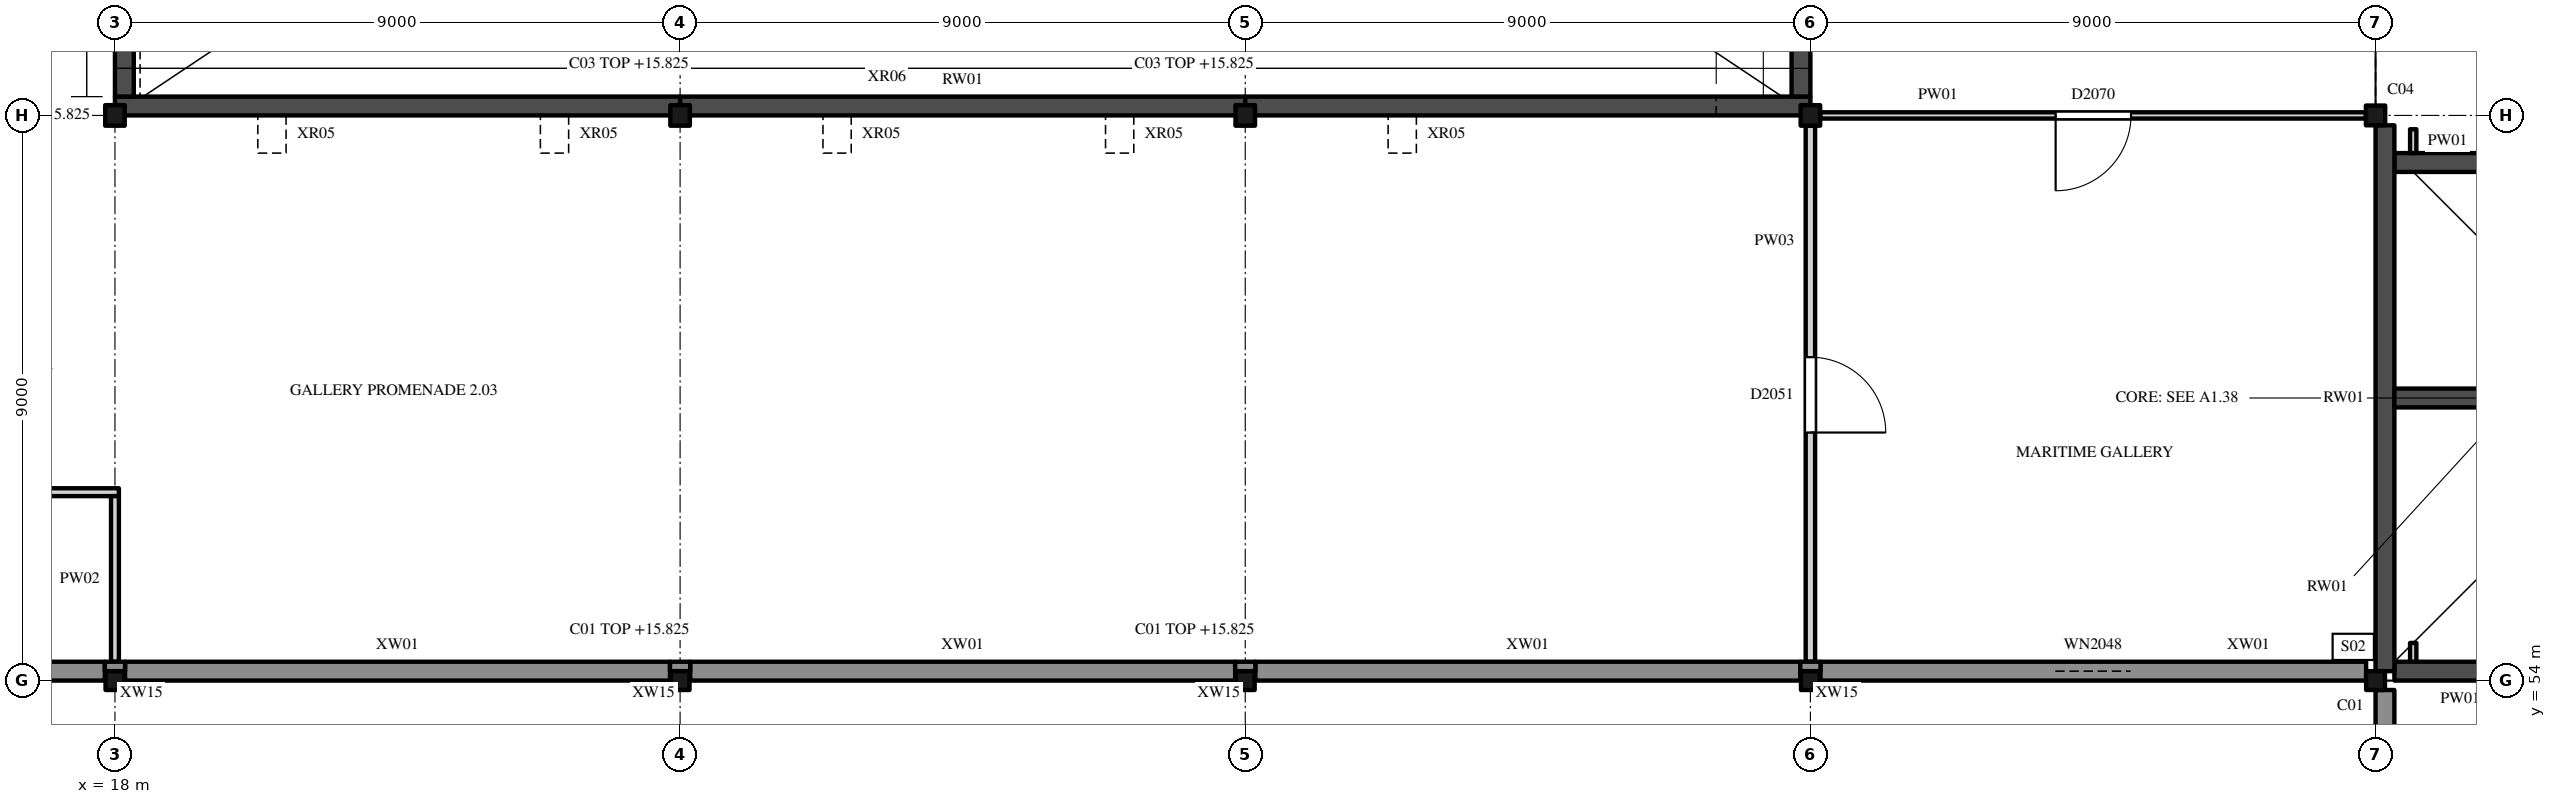
"""IFC4 building model, lengths in metres.
Left out: names, types, materials, properties, quantities, classifications, styles, units other than length and angle.
Written with IfcOpenShell. Run it as: python <this file> out.ifc"""

import sys

from ifc_helpers import new_model, si_unit, direction, frame, frame_2d, origin, origin_2d, place, context, subcontext, project, spatial, polyline, rectangle, hollow_rectangle, i_section, outline, extrude, element, fill, save


model = new_model("IFC4")
c1 = context("Model", 3, precision=1e-05, world=origin(), true_north=direction((0.0, 1.0)))
c2 = subcontext(c1, "Body", "Model", "MODEL_VIEW")
j1 = project(units=[si_unit("LENGTHUNIT", "METRE"), si_unit("PLANEANGLEUNIT", "RADIAN")], contexts=[c1])
p1 = place(None, origin())
s1 = spatial("IfcSite", under=j1, at=p1, CompositionType="ELEMENT")
p2 = place(p1, origin())
s2 = spatial("IfcBuilding", under=s1, at=p2, CompositionType="ELEMENT")
p3 = place(p2, frame((0.0, 0.0, 11.0)))
s3 = spatial("IfcBuildingStorey", under=s2, at=p3, CompositionType="ELEMENT", Elevation=11.0)
for number, where, z_axis, x_axis in (
    (1, (18.0, 54.0, 0.0), (0.0, 0.0, 1.0), (1.0, 0.0, 0.0)),
    (2, (27.0, 54.0, 0.0), (0.0, 0.0, 1.0), (1.0, 0.0, 0.0)),
    (3, (36.0, 54.0, 0.0), (0.0, 0.0, 1.0), (1.0, 0.0, 0.0)),
    (4, (45.0, 54.0, 0.0), (0.0, 0.0, 1.0), (1.0, 0.0, 0.0)),
):
    element("IfcColumn", number, at=place(p3, frame(where, z_axis=z_axis, x_axis=x_axis)), inside=s3, PredefinedType="COLUMN", context=c2, shape_type="SweptSolid", body=[
        extrude(hollow_rectangle(XDim=0.3, YDim=0.3, WallThickness=0.012, InnerFilletRadius=0.019, OuterFilletRadius=0.031, at=origin_2d()), origin(), (0.0, 0.0, 1.0), 4.825),
    ])
p4 = place(p3, frame((54.0, 54.0, 0.0), z_axis=(0.0, 0.0, 1.0), x_axis=(1.0, 0.0, 0.0)))
e5 = element("IfcColumn", 5, at=p4, inside=s3, PredefinedType="COLUMN", context=c2, shape_type="SweptSolid", body=[
    extrude(hollow_rectangle(XDim=0.3, YDim=0.3, WallThickness=0.012, InnerFilletRadius=0.019, OuterFilletRadius=0.031, at=origin_2d()), origin(), (0.0, 0.0, 1.0), 5.0),
])
for number, where, z_axis, x_axis in (
    (6, (18.0, 63.0, 0.0), (0.0, 0.0, 1.0), (1.0, 0.0, 0.0)),
    (7, (27.0, 63.0, 0.0), (0.0, 0.0, 1.0), (1.0, 0.0, 0.0)),
    (8, (36.0, 63.0, 0.0), (0.0, 0.0, 1.0), (1.0, 0.0, 0.0)),
    (9, (45.0, 63.0, 0.0), (0.0, 0.0, 1.0), (1.0, 0.0, 0.0)),
):
    element("IfcColumn", number, at=place(p3, frame(where, z_axis=z_axis, x_axis=x_axis)), inside=s3, PredefinedType="COLUMN", context=c2, shape_type="SweptSolid", body=[
        extrude(i_section(OverallWidth=0.311, OverallDepth=0.327, WebThickness=0.016, FlangeThickness=0.025, FilletRadius=0.017, at=origin_2d()), origin(), (0.0, 0.0, 1.0), 4.825),
    ])
p5 = place(p3, frame((54.0, 63.0, 0.0), z_axis=(0.0, 0.0, 1.0), x_axis=(1.0, 0.0, 0.0)))
e10 = element("IfcColumn", 10, at=p5, inside=s3, PredefinedType="COLUMN", context=c2, shape_type="SweptSolid", body=[
    extrude(i_section(OverallWidth=0.307, OverallDepth=0.315, WebThickness=0.012, FlangeThickness=0.019, FilletRadius=0.017, at=origin_2d()), origin(), (0.0, 0.0, 1.0), 5.0),
])
p6 = place(p3, frame((54.3, 54.15, 0.0), z_axis=(0.0, 0.0, 1.0), x_axis=(1.0, 0.0, 0.0)))
e11 = element("IfcWall", 11, at=p6, inside=s3, PredefinedType="SHEAR", context=c2, shape_type="SweptSolid", body=[
    extrude(rectangle(XDim=8.546, YDim=0.3, at=frame_2d((4.273, 0.0))), origin(), (0.0, 0.0, 1.0), 5.0),
])
p7 = place(p3, frame((54.3, 62.25, 0.0), z_axis=(0.0, 0.0, 1.0), x_axis=(1.0, 0.0, 0.0)))
e12 = element("IfcWall", 12, at=p7, inside=s3, PredefinedType="SHEAR", context=c2, shape_type="SweptSolid", body=[
    extrude(rectangle(XDim=8.1, YDim=0.3, at=frame_2d((4.05, 0.0))), origin(), (0.0, 0.0, 1.0), 5.0),
])
p8 = place(p3, frame((54.15, 54.15, 0.0), z_axis=(0.0, 0.0, 1.0), x_axis=(0.0, 1.0, 0.0)))
e13 = element("IfcWall", 13, at=p8, inside=s3, PredefinedType="SHEAR", context=c2, shape_type="SweptSolid", body=[
    extrude(rectangle(XDim=8.693, YDim=0.3, at=frame_2d((4.346, 0.0))), origin(), (0.0, 0.0, 1.0), 5.0),
])
p9 = place(p3, frame((58.2, 58.5, 0.0), z_axis=(0.0, 0.0, 1.0), x_axis=(-1.0, 0.0, 0.0)))
e14 = element("IfcWall", 14, at=p9, inside=s3, PredefinedType="SHEAR", context=c2, shape_type="SweptSolid", body=[
    extrude(rectangle(XDim=3.9, YDim=0.3, at=frame_2d((1.95, 0.0))), origin(), (0.0, 0.0, 1.0), 5.0),
])
for number, where, z_axis, x_axis in (
    (15, (18.0, 63.15, 0.0), (0.0, 0.0, 1.0), (1.0, 0.0, 0.0)),
    (16, (27.0, 63.15, 0.0), (0.0, 0.0, 1.0), (1.0, 0.0, 0.0)),
    (17, (36.0, 63.15, 0.0), (0.0, 0.0, 1.0), (1.0, 0.0, 0.0)),
):
    element("IfcWall", number, at=place(p3, frame(where, z_axis=z_axis, x_axis=x_axis)), inside=s3, PredefinedType="SHEAR", context=c2, shape_type="SweptSolid", body=[
        extrude(rectangle(XDim=9.0, YDim=0.3, at=frame_2d((4.5, 0.0))), origin(), (0.0, 0.0, 1.0), 5.0),
    ])
p10 = place(p3, frame((18.15, 63.3, 0.0), z_axis=(0.0, 0.0, 1.0), x_axis=(0.0, 1.0, 0.0)))
e18 = element("IfcWall", 18, at=p10, inside=s3, PredefinedType="SHEAR", context=c2, shape_type="SweptSolid", body=[
    extrude(rectangle(XDim=8.7, YDim=0.3, at=frame_2d((4.35, 0.0))), origin(), (0.0, 0.0, 1.0), 5.0),
])
p11 = place(p3, frame((44.85, 63.3, 0.0), z_axis=(0.0, 0.0, 1.0), x_axis=(0.0, 1.0, 0.0)))
e19 = element("IfcWall", 19, at=p11, inside=s3, PredefinedType="SHEAR", context=c2, shape_type="SweptSolid", body=[
    extrude(rectangle(XDim=8.7, YDim=0.3, at=frame_2d((4.35, 0.0))), origin(), (0.0, 0.0, 1.0), 4.781),
])
p12 = place(p3, frame((54.15, 45.161, 0.0), z_axis=(0.0, 0.0, 1.0), x_axis=(0.0, 1.0, 0.0)))
e20 = element("IfcWall", 20, at=p12, inside=s3, PredefinedType="SOLIDWALL", context=c2, shape_type="SweptSolid", body=[
    extrude(rectangle(XDim=8.689, YDim=0.3, at=frame_2d((4.345, 0.0))), origin(), (0.0, 0.0, 1.0), 4.825),
])
p13 = place(p12, frame((1.489, 0.0, 1.2)))
e21 = element("IfcOpeningElement", 21, at=p13, cuts=e20, PredefinedType="OPENING", context=c2, shape_type="SweptSolid", body=[
    extrude(rectangle(XDim=1.2, YDim=1.5, at=frame_2d((0.6, 0.75))), frame((0.0, 0.16, 0.0), z_axis=(0.0, -1.0, 0.0), x_axis=(1.0, 0.0, 0.0)), (0.0, 0.0, 1.0), 0.32),
])
p14 = place(p12, frame((5.989, 0.0, 1.2)))
e22 = element("IfcOpeningElement", 22, at=p14, cuts=e20, PredefinedType="OPENING", context=c2, shape_type="SweptSolid", body=[
    extrude(rectangle(XDim=1.2, YDim=1.5, at=frame_2d((0.6, 0.75))), frame((0.0, 0.16, 0.0), z_axis=(0.0, -1.0, 0.0), x_axis=(1.0, 0.0, 0.0)), (0.0, 0.0, 1.0), 0.32),
])
p15 = place(p3, frame((9.172, 54.15, 0.0), z_axis=(0.0, 0.0, 1.0), x_axis=(1.0, 0.0, 0.0)))
e23 = element("IfcWall", 23, at=p15, inside=s3, PredefinedType="SOLIDWALL", context=c2, shape_type="SweptSolid", body=[
    extrude(rectangle(XDim=8.667, YDim=0.3, at=frame_2d((4.333, 0.0))), origin(), (0.0, 0.0, 1.0), 4.825),
])
for number, where, z_axis, x_axis in (
    (24, (18.161, 54.15, 0.0), (0.0, 0.0, 1.0), (1.0, 0.0, 0.0)),
    (25, (27.161, 54.15, 0.0), (0.0, 0.0, 1.0), (1.0, 0.0, 0.0)),
    (26, (36.161, 54.15, 0.0), (0.0, 0.0, 1.0), (1.0, 0.0, 0.0)),
):
    element("IfcWall", number, at=place(p3, frame(where, z_axis=z_axis, x_axis=x_axis)), inside=s3, PredefinedType="SOLIDWALL", context=c2, shape_type="SweptSolid", body=[
        extrude(rectangle(XDim=8.678, YDim=0.3, at=frame_2d((4.339, 0.0))), origin(), (0.0, 0.0, 1.0), 4.825),
    ])
p16 = place(p3, frame((45.161, 54.15, 0.0), z_axis=(0.0, 0.0, 1.0), x_axis=(1.0, 0.0, 0.0)))
e27 = element("IfcWall", 27, at=p16, inside=s3, PredefinedType="SOLIDWALL", context=c2, shape_type="SweptSolid", body=[
    extrude(rectangle(XDim=8.689, YDim=0.3, at=frame_2d((4.345, 0.0))), origin(), (0.0, 0.0, 1.0), 4.825),
])
p17 = place(p16, frame((3.739, 0.0, 1.0)))
e28 = element("IfcOpeningElement", 28, at=p17, cuts=e27, PredefinedType="OPENING", context=c2, shape_type="SweptSolid", body=[
    extrude(rectangle(XDim=1.2, YDim=3.0, at=frame_2d((0.6, 1.5))), frame((0.0, 0.16, 0.0), z_axis=(0.0, -1.0, 0.0), x_axis=(1.0, 0.0, 0.0)), (0.0, 0.0, 1.0), 0.32),
])
for number, where, z_axis, x_axis in (
    (29, (17.839, 54.225, 0.0), (0.0, 0.0, 1.0), (1.0, 0.0, 0.0)),
    (30, (26.839, 54.225, 0.0), (0.0, 0.0, 1.0), (1.0, 0.0, 0.0)),
    (31, (35.839, 54.225, 0.0), (0.0, 0.0, 1.0), (1.0, 0.0, 0.0)),
    (32, (44.839, 54.225, 0.0), (0.0, 0.0, 1.0), (1.0, 0.0, 0.0)),
):
    element("IfcWall", number, at=place(p3, frame(where, z_axis=z_axis, x_axis=x_axis)), inside=s3, PredefinedType="SOLIDWALL", context=c2, shape_type="SweptSolid", body=[
        extrude(rectangle(XDim=0.322, YDim=0.15, at=frame_2d((0.161, 0.0))), origin(), (0.0, 0.0, 1.0), 4.825),
    ])
p18 = place(p3, frame((18.2, 63.3, 5.0), z_axis=(0.0, 0.0, 1.0), x_axis=(0.0, 1.0, 0.0)))
e33 = element("IfcWall", 33, at=p18, inside=s3, PredefinedType="SOLIDWALL", context=c2, shape_type="SweptSolid", body=[
    extrude(rectangle(XDim=17.4, YDim=0.4, at=frame_2d((8.7, 0.0))), origin(), (0.0, 0.0, 1.0), 6.638),
])
p19 = place(p3, frame((18.0, 63.15, 5.0), z_axis=(0.0, 0.0, 1.0), x_axis=(1.0, 0.0, 0.0)))
e34 = element("IfcWall", 34, at=p19, inside=s3, PredefinedType="SOLIDWALL", context=c2, shape_type="SweptSolid", body=[
    extrude(outline(polyline([(0.0, 0.0), (25.5, 0.0), (25.5, 0.131), (0.0, 6.742), (0.0, 0.0)])), frame((0.0, 0.15, 0.0), z_axis=(0.0, -1.0, 0.0), x_axis=(1.0, 0.0, 0.0)), (0.0, 0.0, 1.0), 0.3),
])
p20 = place(p3, frame((20.5, 63.0, 5.0), z_axis=(0.0, 0.0, 1.0), x_axis=(0.0, -1.0, 0.0)))
e35 = element("IfcWall", 35, at=p20, inside=s3, PredefinedType="SOLIDWALL", context=c2, shape_type="SweptSolid", body=[
    extrude(rectangle(XDim=0.6, YDim=0.45, at=frame_2d((0.3, 0.0))), origin(), (0.0, 0.0, 1.0), 6.035),
])
p21 = place(p3, frame((25.0, 63.0, 5.0), z_axis=(0.0, 0.0, 1.0), x_axis=(0.0, -1.0, 0.0)))
e36 = element("IfcWall", 36, at=p21, inside=s3, PredefinedType="SOLIDWALL", context=c2, shape_type="SweptSolid", body=[
    extrude(rectangle(XDim=0.6, YDim=0.45, at=frame_2d((0.3, 0.0))), origin(), (0.0, 0.0, 1.0), 4.869),
])
p22 = place(p3, frame((29.5, 63.0, 5.0), z_axis=(0.0, 0.0, 1.0), x_axis=(0.0, -1.0, 0.0)))
e37 = element("IfcWall", 37, at=p22, inside=s3, PredefinedType="SOLIDWALL", context=c2, shape_type="SweptSolid", body=[
    extrude(rectangle(XDim=0.6, YDim=0.45, at=frame_2d((0.3, 0.0))), origin(), (0.0, 0.0, 1.0), 3.702),
])
p23 = place(p3, frame((34.0, 63.0, 5.0), z_axis=(0.0, 0.0, 1.0), x_axis=(0.0, -1.0, 0.0)))
e38 = element("IfcWall", 38, at=p23, inside=s3, PredefinedType="SOLIDWALL", context=c2, shape_type="SweptSolid", body=[
    extrude(rectangle(XDim=0.6, YDim=0.45, at=frame_2d((0.3, 0.0))), origin(), (0.0, 0.0, 1.0), 2.535),
])
p24 = place(p3, frame((38.5, 63.0, 5.0), z_axis=(0.0, 0.0, 1.0), x_axis=(0.0, -1.0, 0.0)))
e39 = element("IfcWall", 39, at=p24, inside=s3, PredefinedType="SOLIDWALL", context=c2, shape_type="SweptSolid", body=[
    extrude(rectangle(XDim=0.6, YDim=0.45, at=frame_2d((0.3, 0.0))), origin(), (0.0, 0.0, 1.0), 1.369),
])
for number, where, z_axis, x_axis in (
    (40, (19.5, 56.325, 5.0), (0.0, 0.0, 1.0), (1.0, 0.0, 0.0)),
    (41, (19.5, 60.675, 5.0), (0.0, 0.0, 1.0), (1.0, 0.0, 0.0)),
):
    element("IfcWall", number, at=place(p3, frame(where, z_axis=z_axis, x_axis=x_axis)), inside=s3, PredefinedType="PARAPET", context=c2, shape_type="SweptSolid", body=[
        extrude(rectangle(XDim=6.0, YDim=0.15, at=frame_2d((3.0, 0.0))), origin(), (0.0, 0.0, 1.0), 0.5),
    ])
for number, where, z_axis, x_axis in (
    (42, (19.575, 56.4, 5.0), (0.0, 0.0, 1.0), (0.0, 1.0, 0.0)),
    (43, (25.425, 56.4, 5.0), (0.0, 0.0, 1.0), (0.0, 1.0, 0.0)),
):
    element("IfcWall", number, at=place(p3, frame(where, z_axis=z_axis, x_axis=x_axis)), inside=s3, PredefinedType="PARAPET", context=c2, shape_type="SweptSolid", body=[
        extrude(rectangle(XDim=4.2, YDim=0.15, at=frame_2d((2.1, 0.0))), origin(), (0.0, 0.0, 1.0), 0.5),
    ])
for number, where, z_axis, x_axis in (
    (44, (28.5, 56.325, 5.0), (0.0, 0.0, 1.0), (1.0, 0.0, 0.0)),
    (45, (28.5, 60.675, 5.0), (0.0, 0.0, 1.0), (1.0, 0.0, 0.0)),
):
    element("IfcWall", number, at=place(p3, frame(where, z_axis=z_axis, x_axis=x_axis)), inside=s3, PredefinedType="PARAPET", context=c2, shape_type="SweptSolid", body=[
        extrude(rectangle(XDim=6.0, YDim=0.15, at=frame_2d((3.0, 0.0))), origin(), (0.0, 0.0, 1.0), 0.5),
    ])
for number, where, z_axis, x_axis in (
    (46, (28.575, 56.4, 5.0), (0.0, 0.0, 1.0), (0.0, 1.0, 0.0)),
    (47, (34.425, 56.4, 5.0), (0.0, 0.0, 1.0), (0.0, 1.0, 0.0)),
):
    element("IfcWall", number, at=place(p3, frame(where, z_axis=z_axis, x_axis=x_axis)), inside=s3, PredefinedType="PARAPET", context=c2, shape_type="SweptSolid", body=[
        extrude(rectangle(XDim=4.2, YDim=0.15, at=frame_2d((2.1, 0.0))), origin(), (0.0, 0.0, 1.0), 0.5),
    ])
for number, where, z_axis, x_axis in (
    (48, (37.5, 56.325, 5.0), (0.0, 0.0, 1.0), (1.0, 0.0, 0.0)),
    (49, (37.5, 60.675, 5.0), (0.0, 0.0, 1.0), (1.0, 0.0, 0.0)),
):
    element("IfcWall", number, at=place(p3, frame(where, z_axis=z_axis, x_axis=x_axis)), inside=s3, PredefinedType="PARAPET", context=c2, shape_type="SweptSolid", body=[
        extrude(rectangle(XDim=6.0, YDim=0.15, at=frame_2d((3.0, 0.0))), origin(), (0.0, 0.0, 1.0), 0.5),
    ])
for number, where, z_axis, x_axis in (
    (50, (37.575, 56.4, 5.0), (0.0, 0.0, 1.0), (0.0, 1.0, 0.0)),
    (51, (43.425, 56.4, 5.0), (0.0, 0.0, 1.0), (0.0, 1.0, 0.0)),
):
    element("IfcWall", number, at=place(p3, frame(where, z_axis=z_axis, x_axis=x_axis)), inside=s3, PredefinedType="PARAPET", context=c2, shape_type="SweptSolid", body=[
        extrude(rectangle(XDim=4.2, YDim=0.15, at=frame_2d((2.1, 0.0))), origin(), (0.0, 0.0, 1.0), 0.5),
    ])
for number, where, z_axis, x_axis in (
    (52, (46.5, 56.325, 5.0), (0.0, 0.0, 1.0), (1.0, 0.0, 0.0)),
    (53, (46.5, 60.675, 5.0), (0.0, 0.0, 1.0), (1.0, 0.0, 0.0)),
):
    element("IfcWall", number, at=place(p3, frame(where, z_axis=z_axis, x_axis=x_axis)), inside=s3, PredefinedType="PARAPET", context=c2, shape_type="SweptSolid", body=[
        extrude(rectangle(XDim=6.0, YDim=0.15, at=frame_2d((3.0, 0.0))), origin(), (0.0, 0.0, 1.0), 0.5),
    ])
for number, where, z_axis, x_axis in (
    (54, (46.575, 56.4, 5.0), (0.0, 0.0, 1.0), (0.0, 1.0, 0.0)),
    (55, (52.425, 56.4, 5.0), (0.0, 0.0, 1.0), (0.0, 1.0, 0.0)),
):
    element("IfcWall", number, at=place(p3, frame(where, z_axis=z_axis, x_axis=x_axis)), inside=s3, PredefinedType="PARAPET", context=c2, shape_type="SweptSolid", body=[
        extrude(rectangle(XDim=4.2, YDim=0.15, at=frame_2d((2.1, 0.0))), origin(), (0.0, 0.0, 1.0), 0.5),
    ])
p25 = place(p3, frame((8.4, 57.0, 0.0), z_axis=(0.0, 0.0, 1.0), x_axis=(1.0, 0.0, 0.0)))
e56 = element("IfcWall", 56, at=p25, inside=s3, PredefinedType="PARTITIONING", context=c2, shape_type="SweptSolid", body=[
    extrude(rectangle(XDim=9.663, YDim=0.125, at=frame_2d((4.831, 0.0))), origin(), (0.0, 0.0, 1.0), 4.422),
])
p26 = place(p25, frame((1.95, 0.0, 0.0)))
e57 = element("IfcOpeningElement", 57, at=p26, cuts=e56, PredefinedType="OPENING", context=c2, shape_type="SweptSolid", body=[
    extrude(rectangle(XDim=0.9, YDim=2.1, at=frame_2d((0.45, 1.05))), frame((0.0, 0.073, 0.0), z_axis=(0.0, -1.0, 0.0), x_axis=(1.0, 0.0, 0.0)), (0.0, 0.0, 1.0), 0.145),
])
p27 = place(p25, frame((6.45, 0.0, 0.0)))
e58 = element("IfcOpeningElement", 58, at=p27, cuts=e56, PredefinedType="OPENING", context=c2, shape_type="SweptSolid", body=[
    extrude(rectangle(XDim=0.9, YDim=2.1, at=frame_2d((0.45, 1.05))), frame((0.0, 0.073, 0.0), z_axis=(0.0, -1.0, 0.0), x_axis=(1.0, 0.0, 0.0)), (0.0, 0.0, 1.0), 0.145),
])
p28 = place(p3, frame((45.156, 63.0, 0.0), z_axis=(0.0, 0.0, 1.0), x_axis=(1.0, 0.0, 0.0)))
e59 = element("IfcWall", 59, at=p28, inside=s3, PredefinedType="PARTITIONING", context=c2, shape_type="SweptSolid", body=[
    extrude(rectangle(XDim=8.691, YDim=0.1, at=frame_2d((4.345, 0.0))), origin(), (0.0, 0.0, 1.0), 4.469),
])
p29 = place(p28, frame((3.75, 0.0, 0.0)))
e60 = element("IfcOpeningElement", 60, at=p29, cuts=e59, PredefinedType="OPENING", context=c2, shape_type="SweptSolid", body=[
    extrude(rectangle(XDim=1.2, YDim=2.4, at=frame_2d((0.6, 1.2))), frame((0.0, 0.06, 0.0), z_axis=(0.0, -1.0, 0.0), x_axis=(1.0, 0.0, 0.0)), (0.0, 0.0, 1.0), 0.12),
])
p30 = place(p3, frame((18.0, 54.3, 0.0), z_axis=(0.0, 0.0, 1.0), x_axis=(0.0, 1.0, 0.0)))
e61 = element("IfcWall", 61, at=p30, inside=s3, PredefinedType="PARTITIONING", context=c2, shape_type="SweptSolid", body=[
    extrude(rectangle(XDim=2.637, YDim=0.125, at=frame_2d((1.319, 0.0))), origin(), (0.0, 0.0, 1.0), 4.371),
])
p31 = place(p3, frame((45.0, 54.3, 0.0), z_axis=(0.0, 0.0, 1.0), x_axis=(0.0, 1.0, 0.0)))
e62 = element("IfcWall", 62, at=p31, inside=s3, PredefinedType="PARTITIONING", context=c2, shape_type="SweptSolid", body=[
    extrude(rectangle(XDim=8.536, YDim=0.15, at=frame_2d((4.268, 0.0))), origin(), (0.0, 0.0, 1.0), 4.371),
])
p32 = place(p31, frame((3.65, 0.0, 0.0)))
e63 = element("IfcOpeningElement", 63, at=p32, cuts=e62, PredefinedType="OPENING", context=c2, shape_type="SweptSolid", body=[
    extrude(rectangle(XDim=1.2, YDim=2.4, at=frame_2d((0.6, 1.2))), frame((0.0, 0.085, 0.0), z_axis=(0.0, -1.0, 0.0), x_axis=(1.0, 0.0, 0.0)), (0.0, 0.0, 1.0), 0.17),
])
p33 = place(p3, frame((54.6, 54.3, 0.0), z_axis=(0.0, 0.0, 1.0), x_axis=(0.0, 1.0, 0.0)))
e64 = element("IfcWall", 64, at=p33, inside=s3, PredefinedType="PARTITIONING", context=c2, shape_type="SweptSolid", body=[
    extrude(rectangle(XDim=0.3, YDim=0.1, at=frame_2d((0.15, 0.0))), origin(), (0.0, 0.0, 1.0), 4.825),
])
p34 = place(p3, frame((54.6, 62.4, 0.0), z_axis=(0.0, 0.0, 1.0), x_axis=(0.0, 1.0, 0.0)))
e65 = element("IfcWall", 65, at=p34, inside=s3, PredefinedType="PARTITIONING", context=c2, shape_type="SweptSolid", body=[
    extrude(rectangle(XDim=0.38, YDim=0.1, at=frame_2d((0.19, 0.0))), origin(), (0.0, 0.0, 1.0), 4.825),
])
p35 = place(p17, origin())
e66 = element("IfcWindow", 66, at=p35, inside=s3, PartitioningType="SINGLE_PANEL", PredefinedType="WINDOW", context=c2, shape_type="SweptSolid", body=[
    extrude(rectangle(XDim=1.2, YDim=3.0, at=frame_2d((0.6, 1.5))), frame((0.0, 0.03, 0.0), z_axis=(0.0, -1.0, 0.0), x_axis=(1.0, 0.0, 0.0)), (0.0, 0.0, 1.0), 0.06),
])
fill(e28, e66)
p36 = place(p32, origin())
e67 = element("IfcDoor", 67, at=p36, inside=s3, OperationType="SINGLE_SWING_LEFT", PredefinedType="DOOR", context=c2, shape_type="SweptSolid", body=[
    extrude(rectangle(XDim=1.2, YDim=2.4, at=frame_2d((0.6, 1.2))), frame((0.0, 0.025, 0.0), z_axis=(0.0, -1.0, 0.0), x_axis=(1.0, 0.0, 0.0)), (0.0, 0.0, 1.0), 0.05),
])
fill(e63, e67)
p37 = place(p29, origin())
e68 = element("IfcDoor", 68, at=p37, inside=s3, OperationType="SINGLE_SWING_LEFT", PredefinedType="DOOR", context=c2, shape_type="SweptSolid", body=[
    extrude(rectangle(XDim=1.2, YDim=2.4, at=frame_2d((0.6, 1.2))), frame((0.0, 0.025, 0.0), z_axis=(0.0, -1.0, 0.0), x_axis=(1.0, 0.0, 0.0)), (0.0, 0.0, 1.0), 0.05),
])
fill(e60, e68)
save(model, sys.argv[1])
